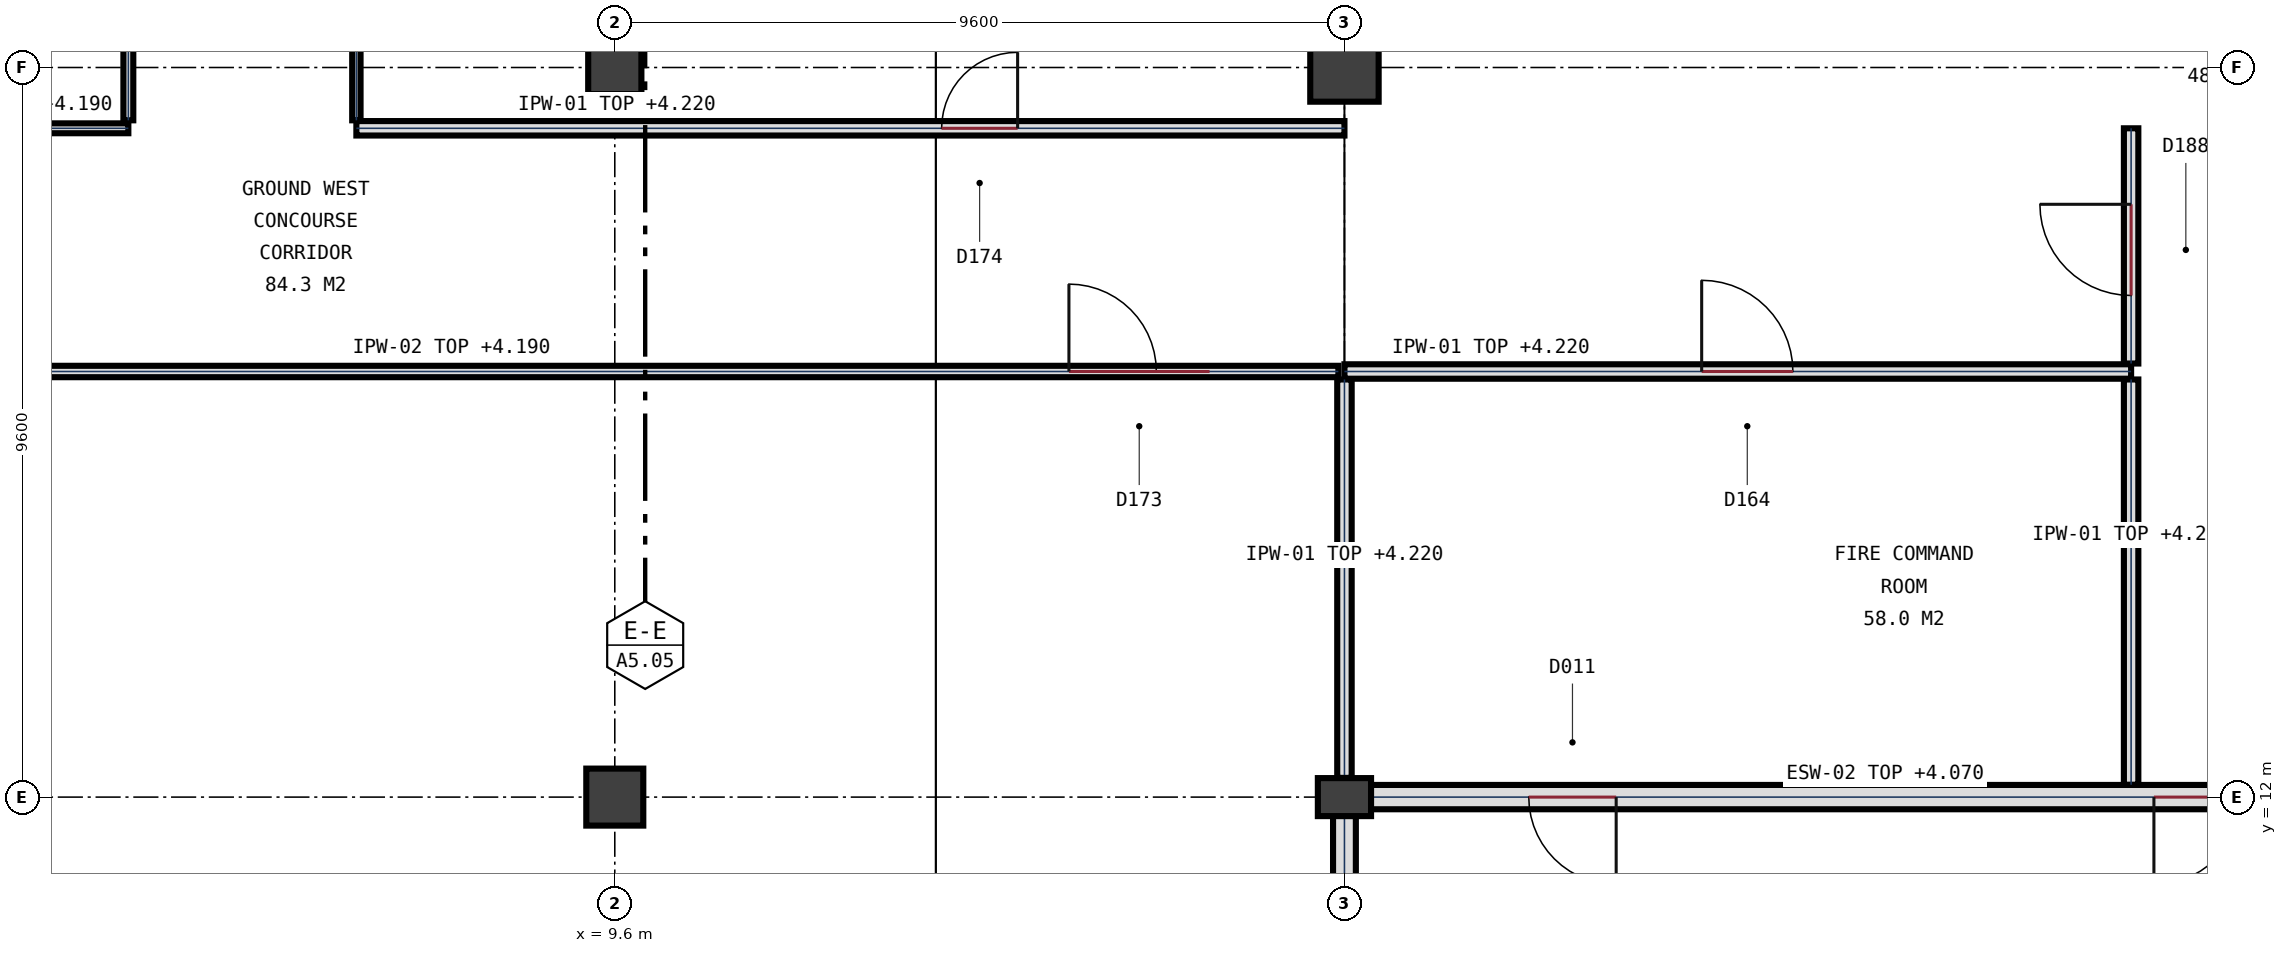
"""IFC4 building model, lengths in metres.
Left out: names, types, materials, properties, quantities, classifications, styles, units other than length and angle.
Written with IfcOpenShell. Run it as: python <this file> out.ifc"""

import sys

from ifc_helpers import new_model, si_unit, direction, frame, frame_2d, origin, origin_2d, place, context, subcontext, project, spatial, rectangle, circle, extrude, element, fill, save


model = new_model("IFC4")
c1 = context("Model", 3, precision=1e-05, world=origin(), true_north=direction((0.0, 1.0)))
c2 = subcontext(c1, "Body", "Model", "MODEL_VIEW")
j1 = project(units=[si_unit("LENGTHUNIT", "METRE"), si_unit("PLANEANGLEUNIT", "RADIAN")], contexts=[c1])
p1 = place(None, origin())
s1 = spatial("IfcSite", under=j1, at=p1, CompositionType="ELEMENT")
p2 = place(p1, origin())
s2 = spatial("IfcBuilding", under=s1, at=p2, CompositionType="ELEMENT")
p3 = place(p2, origin())
s3 = spatial("IfcBuildingStorey", under=s2, at=p3, CompositionType="ELEMENT", Elevation=0.0)
p4 = place(p3, frame((9.6, 12.0, 0.0), z_axis=(0.0, 0.0, 1.0), x_axis=(1.0, 0.0, 0.0)))
e1 = element("IfcColumn", 1, at=p4, inside=s3, PredefinedType="COLUMN", context=c2, shape_type="SweptSolid", body=[
    extrude(rectangle(XDim=0.75, YDim=0.75, at=origin_2d()), origin(), (0.0, 0.0, 1.0), 5.4),
])
p5 = place(p3, frame((9.6, 21.6, 0.0), z_axis=(0.0, 0.0, 1.0), x_axis=(1.0, 0.0, 0.0)))
e2 = element("IfcColumn", 2, at=p5, inside=s3, PredefinedType="COLUMN", context=c2, shape_type="SweptSolid", body=[
    extrude(rectangle(XDim=0.7, YDim=0.7, at=origin_2d()), origin(), (0.0, 0.0, 1.0), 5.4),
])
p6 = place(p3, frame((19.2, 12.0, 0.0), z_axis=(0.0, 0.0, 1.0), x_axis=(1.0, 0.0, 0.0)))
e3 = element("IfcColumn", 3, at=p6, inside=s3, PredefinedType="COLUMN", context=c2, shape_type="SweptSolid", body=[
    extrude(rectangle(XDim=0.7, YDim=0.5, at=origin_2d()), origin(), (0.0, 0.0, 1.0), 5.4),
])
p7 = place(p3, frame((19.2, 21.6, 0.0), z_axis=(0.0, 0.0, 1.0), x_axis=(1.0, 0.0, 0.0)))
e4 = element("IfcColumn", 4, at=p7, inside=s3, PredefinedType="COLUMN", context=c2, shape_type="SweptSolid", body=[
    extrude(circle(Radius=0.45, at=origin_2d()), origin(), (0.0, 0.0, 1.0), 5.4),
])
p8 = place(p3, frame((32.327, 12.0, 0.0), z_axis=(0.0, 0.0, 1.0), x_axis=(-1.0, 0.0, 0.0)))
e5 = element("IfcWall", 5, at=p8, inside=s3, PredefinedType="SOLIDWALL", context=c2, shape_type="SweptSolid", body=[
    extrude(rectangle(XDim=12.779, YDim=0.32, at=frame_2d((6.389, 0.0))), origin(), (0.0, 0.0, 1.0), 4.07),
])
p9 = place(p8, frame((9.552, 0.0, 0.0)))
e6 = element("IfcOpeningElement", 6, at=p9, cuts=e5, PredefinedType="OPENING", context=c2, shape_type="SweptSolid", body=[
    extrude(rectangle(XDim=1.15, YDim=2.15, at=frame_2d((0.575, 1.075))), frame((0.0, 0.17, 0.0), z_axis=(0.0, -1.0, 0.0), x_axis=(1.0, 0.0, 0.0)), (0.0, 0.0, 1.0), 0.34),
])
p10 = place(p8, frame((0.477, 0.0, 0.0)))
e7 = element("IfcOpeningElement", 7, at=p10, cuts=e5, PredefinedType="OPENING", context=c2, shape_type="SweptSolid", body=[
    extrude(rectangle(XDim=2.0, YDim=2.35, at=frame_2d((1.0, 1.175))), frame((0.0, 0.17, 0.0), z_axis=(0.0, -1.0, 0.0), x_axis=(1.0, 0.0, 0.0)), (0.0, 0.0, 1.0), 0.34),
])
p11 = place(p3, frame((19.2, 11.752, 0.0), z_axis=(0.0, 0.0, 1.0), x_axis=(0.0, -1.0, 0.0)))
e8 = element("IfcWall", 8, at=p11, inside=s3, PredefinedType="SOLIDWALL", context=c2, shape_type="SweptSolid", body=[
    extrude(rectangle(XDim=2.95, YDim=0.3, at=frame_2d((1.475, 0.0))), origin(), (0.0, 0.0, 1.0), 4.22),
])
p12 = place(p3, frame((19.2, 17.6, 0.0), z_axis=(0.0, 0.0, 1.0), x_axis=(1.0, 0.0, 0.0)))
e9 = element("IfcWall", 9, at=p12, inside=s3, PredefinedType="PARTITIONING", context=c2, shape_type="SweptSolid", body=[
    extrude(rectangle(XDim=10.35, YDim=0.19, at=frame_2d((5.175, 0.0))), origin(), (0.0, 0.0, 1.0), 4.22),
])
p13 = place(p12, frame((4.7, 0.0, 0.0)))
e10 = element("IfcOpeningElement", 10, at=p13, cuts=e9, PredefinedType="OPENING", context=c2, shape_type="SweptSolid", body=[
    extrude(rectangle(XDim=1.2, YDim=2.2, at=frame_2d((0.6, 1.1))), frame((0.0, 0.105, 0.0), z_axis=(0.0, -1.0, 0.0), x_axis=(1.0, 0.0, 0.0)), (0.0, 0.0, 1.0), 0.21),
])
p14 = place(p3, frame((19.2, 12.253, 0.0), z_axis=(0.0, 0.0, 1.0), x_axis=(0.0, 1.0, 0.0)))
e11 = element("IfcWall", 11, at=p14, inside=s3, PredefinedType="PARTITIONING", context=c2, shape_type="SweptSolid", body=[
    extrude(rectangle(XDim=5.242, YDim=0.19, at=frame_2d((2.621, 0.0))), origin(), (0.0, 0.0, 1.0), 4.22),
])
p15 = place(p3, frame((29.55, 12.163, 0.0), z_axis=(0.0, 0.0, 1.0), x_axis=(0.0, 1.0, 0.0)))
e12 = element("IfcWall", 12, at=p15, inside=s3, PredefinedType="PARTITIONING", context=c2, shape_type="SweptSolid", body=[
    extrude(rectangle(XDim=5.332, YDim=0.19, at=frame_2d((2.666, 0.0))), origin(), (0.0, 0.0, 1.0), 4.22),
])
p16 = place(p3, frame((29.55, 17.705, 0.0), z_axis=(0.0, 0.0, 1.0), x_axis=(0.0, 1.0, 0.0)))
e13 = element("IfcWall", 13, at=p16, inside=s3, PredefinedType="PARTITIONING", context=c2, shape_type="SweptSolid", body=[
    extrude(rectangle(XDim=3.095, YDim=0.19, at=frame_2d((1.547, 0.0))), origin(), (0.0, 0.0, 1.0), 5.08),
])
p17 = place(p16, frame((0.895, 0.0, 0.0)))
e14 = element("IfcOpeningElement", 14, at=p17, cuts=e13, PredefinedType="OPENING", context=c2, shape_type="SweptSolid", body=[
    extrude(rectangle(XDim=1.2, YDim=2.2, at=frame_2d((0.6, 1.1))), frame((0.0, 0.105, 0.0), z_axis=(0.0, -1.0, 0.0), x_axis=(1.0, 0.0, 0.0)), (0.0, 0.0, 1.0), 0.21),
])
p18 = place(p3, frame((0.178, 17.6, 0.0), z_axis=(0.0, 0.0, 1.0), x_axis=(1.0, 0.0, 0.0)))
e15 = element("IfcWall", 15, at=p18, inside=s3, PredefinedType="PARTITIONING", context=c2, shape_type="SweptSolid", body=[
    extrude(rectangle(XDim=18.942, YDim=0.15, at=frame_2d((9.471, 0.0))), origin(), (0.0, 0.0, 1.0), 4.19),
])
p19 = place(p18, frame((15.397, 0.0, 0.0)))
e16 = element("IfcOpeningElement", 16, at=p19, cuts=e15, PredefinedType="OPENING", context=c2, shape_type="SweptSolid", body=[
    extrude(rectangle(XDim=1.85, YDim=2.35, at=frame_2d((0.925, 1.175))), frame((0.0, 0.085, 0.0), z_axis=(0.0, -1.0, 0.0), x_axis=(1.0, 0.0, 0.0)), (0.0, 0.0, 1.0), 0.17),
])
p20 = place(p3, frame((0.178, 20.8, 0.0), z_axis=(0.0, 0.0, 1.0), x_axis=(1.0, 0.0, 0.0)))
e17 = element("IfcWall", 17, at=p20, inside=s3, PredefinedType="PARTITIONING", context=c2, shape_type="SweptSolid", body=[
    extrude(rectangle(XDim=3.022, YDim=0.13, at=frame_2d((1.511, 0.0))), origin(), (0.0, 0.0, 1.0), 4.19),
])
p21 = place(p3, frame((6.2, 20.8, 0.0), z_axis=(0.0, 0.0, 1.0), x_axis=(1.0, 0.0, 0.0)))
e18 = element("IfcWall", 18, at=p21, inside=s3, PredefinedType="PARTITIONING", context=c2, shape_type="SweptSolid", body=[
    extrude(rectangle(XDim=13.0, YDim=0.19, at=frame_2d((6.5, 0.0))), origin(), (0.0, 0.0, 1.0), 4.22),
])
p22 = place(p21, frame((7.7, 0.0, 0.0)))
e19 = element("IfcOpeningElement", 19, at=p22, cuts=e18, PredefinedType="OPENING", context=c2, shape_type="SweptSolid", body=[
    extrude(rectangle(XDim=1.0, YDim=2.2, at=frame_2d((0.5, 1.1))), frame((0.0, 0.105, 0.0), z_axis=(0.0, -1.0, 0.0), x_axis=(1.0, 0.0, 0.0)), (0.0, 0.0, 1.0), 0.21),
])
p23 = place(p3, frame((3.2, 20.905, 0.0), z_axis=(0.0, 0.0, 1.0), x_axis=(0.0, 1.0, 0.0)))
e20 = element("IfcWall", 20, at=p23, inside=s3, PredefinedType="PARTITIONING", context=c2, shape_type="SweptSolid", body=[
    extrude(rectangle(XDim=26.99, YDim=0.13, at=frame_2d((13.495, 0.0))), origin(), (0.0, 0.0, 1.0), 4.09),
])
p24 = place(p23, frame((14.595, 0.0, 0.0)))
e21 = element("IfcOpeningElement", 21, at=p24, cuts=e20, PredefinedType="OPENING", context=c2, shape_type="SweptSolid", body=[
    extrude(rectangle(XDim=1.0, YDim=2.2, at=frame_2d((0.5, 1.1))), frame((0.0, 0.075, 0.0), z_axis=(0.0, -1.0, 0.0), x_axis=(1.0, 0.0, 0.0)), (0.0, 0.0, 1.0), 0.15),
])
p25 = place(p3, frame((6.2, 20.905, 0.0), z_axis=(0.0, 0.0, 1.0), x_axis=(0.0, 1.0, 0.0)))
e22 = element("IfcWall", 22, at=p25, inside=s3, PredefinedType="PARTITIONING", context=c2, shape_type="SweptSolid", body=[
    extrude(rectangle(XDim=26.99, YDim=0.11, at=frame_2d((13.495, 0.0))), origin(), (0.0, 0.0, 1.0), 4.09),
])
p26 = place(p9, origin())
e23 = element("IfcDoor", 23, at=p26, inside=s3, OperationType="SINGLE_SWING_LEFT", PredefinedType="DOOR", context=c2, shape_type="SweptSolid", body=[
    extrude(rectangle(XDim=1.15, YDim=2.15, at=frame_2d((0.575, 1.075))), frame((0.0, 0.032, 0.0), z_axis=(0.0, -1.0, 0.0), x_axis=(1.0, 0.0, 0.0)), (0.0, 0.0, 1.0), 0.065),
])
fill(e6, e23)
p27 = place(p10, origin())
e24 = element("IfcDoor", 24, at=p27, inside=s3, OperationType="SINGLE_SWING_RIGHT", PredefinedType="DOOR", context=c2, shape_type="SweptSolid", body=[
    extrude(rectangle(XDim=2.0, YDim=2.35, at=frame_2d((1.0, 1.175))), frame((0.0, 0.032, 0.0), z_axis=(0.0, -1.0, 0.0), x_axis=(1.0, 0.0, 0.0)), (0.0, 0.0, 1.0), 0.065),
])
fill(e7, e24)
p28 = place(p13, origin())
e25 = element("IfcDoor", 25, at=p28, inside=s3, OperationType="SINGLE_SWING_LEFT", PredefinedType="DOOR", context=c2, shape_type="SweptSolid", body=[
    extrude(rectangle(XDim=1.2, YDim=2.2, at=frame_2d((0.6, 1.1))), frame((0.0, 0.032, 0.0), z_axis=(0.0, -1.0, 0.0), x_axis=(1.0, 0.0, 0.0)), (0.0, 0.0, 1.0), 0.065),
])
fill(e10, e25)
p29 = place(p19, origin())
e26 = element("IfcDoor", 26, at=p29, inside=s3, OperationType="SINGLE_SWING_LEFT", PredefinedType="DOOR", context=c2, shape_type="SweptSolid", body=[
    extrude(rectangle(XDim=1.85, YDim=2.35, at=frame_2d((0.925, 1.175))), frame((0.0, 0.032, 0.0), z_axis=(0.0, -1.0, 0.0), x_axis=(1.0, 0.0, 0.0)), (0.0, 0.0, 1.0), 0.065),
])
fill(e16, e26)
p30 = place(p22, origin())
e27 = element("IfcDoor", 27, at=p30, inside=s3, OperationType="SINGLE_SWING_RIGHT", PredefinedType="DOOR", context=c2, shape_type="SweptSolid", body=[
    extrude(rectangle(XDim=1.0, YDim=2.2, at=frame_2d((0.5, 1.1))), frame((0.0, 0.032, 0.0), z_axis=(0.0, -1.0, 0.0), x_axis=(1.0, 0.0, 0.0)), (0.0, 0.0, 1.0), 0.065),
])
fill(e19, e27)
p31 = place(p17, origin())
e28 = element("IfcDoor", 28, at=p31, inside=s3, OperationType="SINGLE_SWING_RIGHT", PredefinedType="DOOR", context=c2, shape_type="SweptSolid", body=[
    extrude(rectangle(XDim=1.2, YDim=2.2, at=frame_2d((0.6, 1.1))), frame((0.0, 0.032, 0.0), z_axis=(0.0, -1.0, 0.0), x_axis=(1.0, 0.0, 0.0)), (0.0, 0.0, 1.0), 0.065),
])
fill(e14, e28)
save(model, sys.argv[1])
